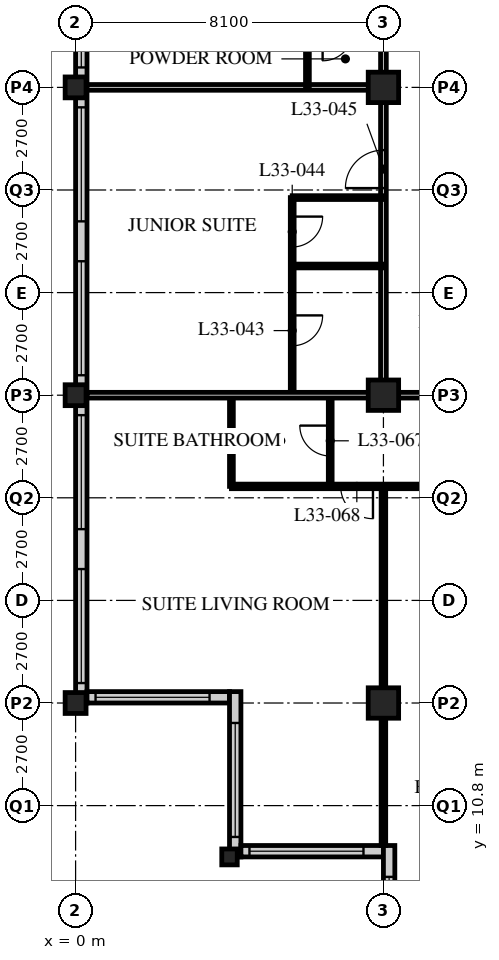
"""IFC4 building model, lengths in metres.
Left out: names, types, materials, properties, quantities, classifications, styles, units other than length and angle.
Written with IfcOpenShell. Run it as: python <this file> out.ifc"""

import sys

from ifc_helpers import new_model, si_unit, direction, frame, frame_2d, origin, origin_2d, place, context, subcontext, project, spatial, rectangle, hollow_rectangle, i_section, extrude, element, fill, save


model = new_model("IFC4")
c1 = context("Model", 3, precision=1e-05, world=origin(), true_north=direction((0.0, 1.0)))
c2 = subcontext(c1, "Body", "Model", "MODEL_VIEW")
j1 = project(units=[si_unit("LENGTHUNIT", "METRE"), si_unit("PLANEANGLEUNIT", "RADIAN")], contexts=[c1])
p1 = place(None, origin())
s1 = spatial("IfcSite", under=j1, at=p1, CompositionType="ELEMENT")
p2 = place(p1, origin())
s2 = spatial("IfcBuilding", under=s1, at=p2, CompositionType="ELEMENT")
p3 = place(p2, frame((0.0, 0.0, 130.6)))
s3 = spatial("IfcBuildingStorey", under=s2, at=p3, CompositionType="ELEMENT", Elevation=130.6)
for number, where, z_axis, x_axis in (
    (1, (0.0, 13.5, 0.0), (0.0, 0.0, 1.0), (1.0, 0.0, 0.0)),
    (2, (0.0, 21.6, 0.0), (0.0, 0.0, 1.0), (1.0, 0.0, 0.0)),
    (3, (0.0, 29.7, 0.0), (0.0, 0.0, 1.0), (1.0, 0.0, 0.0)),
):
    element("IfcColumn", number, at=place(p3, frame(where, z_axis=z_axis, x_axis=x_axis)), inside=s3, PredefinedType="COLUMN", context=c2, shape_type="SweptSolid", body=[
        extrude(hollow_rectangle(XDim=0.55, YDim=0.55, WallThickness=0.04, at=origin_2d()), origin(), (0.0, 0.0, 1.0), 3.4),
    ])
p4 = place(p3, frame((4.05, 9.45, 0.0), z_axis=(0.0, 0.0, 1.0), x_axis=(1.0, 0.0, 0.0)))
e4 = element("IfcColumn", 4, at=p4, inside=s3, PredefinedType="COLUMN", context=c2, shape_type="SweptSolid", body=[
    extrude(i_section(OverallWidth=0.407, OverallDepth=0.419, WebThickness=0.031, FlangeThickness=0.049, FilletRadius=0.015, at=origin_2d()), origin(), (0.0, 0.0, 1.0), 3.4),
])
for number, where, z_axis, x_axis in (
    (5, (8.1, 13.5, 0.0), (0.0, 0.0, 1.0), (1.0, 0.0, 0.0)),
    (6, (8.1, 21.6, 0.0), (0.0, 0.0, 1.0), (1.0, 0.0, 0.0)),
    (7, (8.1, 29.7, 0.0), (0.0, 0.0, 1.0), (1.0, 0.0, 0.0)),
):
    element("IfcColumn", number, at=place(p3, frame(where, z_axis=z_axis, x_axis=x_axis)), inside=s3, PredefinedType="COLUMN", context=c2, shape_type="SweptSolid", body=[
        extrude(hollow_rectangle(XDim=0.8, YDim=0.8, WallThickness=0.08, at=origin_2d()), origin(), (0.0, 0.0, 1.0), 3.4),
    ])
p5 = place(p3, frame((0.15, 45.6, 0.0), z_axis=(0.0, 0.0, 1.0), x_axis=(0.0, -1.0, 0.0)))
e8 = element("IfcWall", 8, at=p5, inside=s3, PredefinedType="SOLIDWALL", context=c2, shape_type="SweptSolid", body=[
    extrude(rectangle(XDim=32.1, YDim=0.3, at=frame_2d((16.05, 0.0))), origin(), (0.0, 0.0, 1.0), 3.19),
])
p6 = place(p5, frame((0.225, 0.0, 0.9)))
e9 = element("IfcOpeningElement", 9, at=p6, cuts=e8, PredefinedType="OPENING", context=c2, shape_type="SweptSolid", body=[
    extrude(rectangle(XDim=3.0, YDim=2.0, at=frame_2d((1.5, 1.0))), frame((0.0, 0.16, 0.0), z_axis=(0.0, -1.0, 0.0), x_axis=(1.0, 0.0, 0.0)), (0.0, 0.0, 1.0), 0.32),
])
p7 = place(p5, frame((4.275, 0.0, 0.9)))
e10 = element("IfcOpeningElement", 10, at=p7, cuts=e8, PredefinedType="OPENING", context=c2, shape_type="SweptSolid", body=[
    extrude(rectangle(XDim=3.0, YDim=2.0, at=frame_2d((1.5, 1.0))), frame((0.0, 0.16, 0.0), z_axis=(0.0, -1.0, 0.0), x_axis=(1.0, 0.0, 0.0)), (0.0, 0.0, 1.0), 0.32),
])
p8 = place(p5, frame((8.325, 0.0, 0.9)))
e11 = element("IfcOpeningElement", 11, at=p8, cuts=e8, PredefinedType="OPENING", context=c2, shape_type="SweptSolid", body=[
    extrude(rectangle(XDim=3.0, YDim=2.0, at=frame_2d((1.5, 1.0))), frame((0.0, 0.16, 0.0), z_axis=(0.0, -1.0, 0.0), x_axis=(1.0, 0.0, 0.0)), (0.0, 0.0, 1.0), 0.32),
])
p9 = place(p5, frame((12.375, 0.0, 0.9)))
e12 = element("IfcOpeningElement", 12, at=p9, cuts=e8, PredefinedType="OPENING", context=c2, shape_type="SweptSolid", body=[
    extrude(rectangle(XDim=3.0, YDim=2.0, at=frame_2d((1.5, 1.0))), frame((0.0, 0.16, 0.0), z_axis=(0.0, -1.0, 0.0), x_axis=(1.0, 0.0, 0.0)), (0.0, 0.0, 1.0), 0.32),
])
p10 = place(p5, frame((16.425, 0.0, 0.9)))
e13 = element("IfcOpeningElement", 13, at=p10, cuts=e8, PredefinedType="OPENING", context=c2, shape_type="SweptSolid", body=[
    extrude(rectangle(XDim=3.0, YDim=2.0, at=frame_2d((1.5, 1.0))), frame((0.0, 0.16, 0.0), z_axis=(0.0, -1.0, 0.0), x_axis=(1.0, 0.0, 0.0)), (0.0, 0.0, 1.0), 0.32),
])
p11 = place(p5, frame((20.475, 0.0, 0.9)))
e14 = element("IfcOpeningElement", 14, at=p11, cuts=e8, PredefinedType="OPENING", context=c2, shape_type="SweptSolid", body=[
    extrude(rectangle(XDim=3.0, YDim=2.0, at=frame_2d((1.5, 1.0))), frame((0.0, 0.16, 0.0), z_axis=(0.0, -1.0, 0.0), x_axis=(1.0, 0.0, 0.0)), (0.0, 0.0, 1.0), 0.32),
])
p12 = place(p5, frame((24.525, 0.0, 0.9)))
e15 = element("IfcOpeningElement", 15, at=p12, cuts=e8, PredefinedType="OPENING", context=c2, shape_type="SweptSolid", body=[
    extrude(rectangle(XDim=3.0, YDim=2.0, at=frame_2d((1.5, 1.0))), frame((0.0, 0.16, 0.0), z_axis=(0.0, -1.0, 0.0), x_axis=(1.0, 0.0, 0.0)), (0.0, 0.0, 1.0), 0.32),
])
p13 = place(p5, frame((28.575, 0.0, 0.9)))
e16 = element("IfcOpeningElement", 16, at=p13, cuts=e8, PredefinedType="OPENING", context=c2, shape_type="SweptSolid", body=[
    extrude(rectangle(XDim=3.0, YDim=2.0, at=frame_2d((1.5, 1.0))), frame((0.0, 0.16, 0.0), z_axis=(0.0, -1.0, 0.0), x_axis=(1.0, 0.0, 0.0)), (0.0, 0.0, 1.0), 0.32),
])
p14 = place(p3, frame((0.3, 13.65, 0.0), z_axis=(0.0, 0.0, 1.0), x_axis=(1.0, 0.0, 0.0)))
e17 = element("IfcWall", 17, at=p14, inside=s3, PredefinedType="SOLIDWALL", context=c2, shape_type="SweptSolid", body=[
    extrude(rectangle(XDim=3.75, YDim=0.3, at=frame_2d((1.875, 0.0))), origin(), (0.0, 0.0, 1.0), 3.19),
])
p15 = place(p14, frame((0.225, 0.0, 0.9)))
e18 = element("IfcOpeningElement", 18, at=p15, cuts=e17, PredefinedType="OPENING", context=c2, shape_type="SweptSolid", body=[
    extrude(rectangle(XDim=3.0, YDim=1.5, at=frame_2d((1.5, 0.75))), frame((0.0, 0.16, 0.0), z_axis=(0.0, -1.0, 0.0), x_axis=(1.0, 0.0, 0.0)), (0.0, 0.0, 1.0), 0.32),
])
p16 = place(p3, frame((4.2, 13.8, 0.0), z_axis=(0.0, 0.0, 1.0), x_axis=(0.0, -1.0, 0.0)))
e19 = element("IfcWall", 19, at=p16, inside=s3, PredefinedType="SOLIDWALL", context=c2, shape_type="SweptSolid", body=[
    extrude(rectangle(XDim=4.35, YDim=0.3, at=frame_2d((2.175, 0.0))), origin(), (0.0, 0.0, 1.0), 3.19),
])
p17 = place(p16, frame((0.825, 0.0, 0.9)))
e20 = element("IfcOpeningElement", 20, at=p17, cuts=e19, PredefinedType="OPENING", context=c2, shape_type="SweptSolid", body=[
    extrude(rectangle(XDim=3.0, YDim=1.5, at=frame_2d((1.5, 0.75))), frame((0.0, 0.16, 0.0), z_axis=(0.0, -1.0, 0.0), x_axis=(1.0, 0.0, 0.0)), (0.0, 0.0, 1.0), 0.32),
])
p18 = place(p3, frame((4.35, 9.6, 0.0), z_axis=(0.0, 0.0, 1.0), x_axis=(1.0, 0.0, 0.0)))
e21 = element("IfcWall", 21, at=p18, inside=s3, PredefinedType="SOLIDWALL", context=c2, shape_type="SweptSolid", body=[
    extrude(rectangle(XDim=3.75, YDim=0.3, at=frame_2d((1.875, 0.0))), origin(), (0.0, 0.0, 1.0), 3.19),
])
p19 = place(p18, frame((0.225, 0.0, 0.9)))
e22 = element("IfcOpeningElement", 22, at=p19, cuts=e21, PredefinedType="OPENING", context=c2, shape_type="SweptSolid", body=[
    extrude(rectangle(XDim=3.0, YDim=1.5, at=frame_2d((1.5, 0.75))), frame((0.0, 0.16, 0.0), z_axis=(0.0, -1.0, 0.0), x_axis=(1.0, 0.0, 0.0)), (0.0, 0.0, 1.0), 0.32),
])
p20 = place(p3, frame((8.25, 9.75, 0.0), z_axis=(0.0, 0.0, 1.0), x_axis=(0.0, -1.0, 0.0)))
e23 = element("IfcWall", 23, at=p20, inside=s3, PredefinedType="SOLIDWALL", context=c2, shape_type="SweptSolid", body=[
    extrude(rectangle(XDim=4.35, YDim=0.3, at=frame_2d((2.175, 0.0))), origin(), (0.0, 0.0, 1.0), 3.19),
])
p21 = place(p20, frame((0.825, 0.0, 0.9)))
e24 = element("IfcOpeningElement", 24, at=p21, cuts=e23, PredefinedType="OPENING", context=c2, shape_type="SweptSolid", body=[
    extrude(rectangle(XDim=3.0, YDim=1.5, at=frame_2d((1.5, 0.75))), frame((0.0, 0.16, 0.0), z_axis=(0.0, -1.0, 0.0), x_axis=(1.0, 0.0, 0.0)), (0.0, 0.0, 1.0), 0.32),
])
p22 = place(p3, frame((8.1, 21.6, 0.0), z_axis=(0.0, 0.0, 1.0), x_axis=(1.0, 0.0, 0.0)))
e25 = element("IfcWall", 25, at=p22, inside=s3, PredefinedType="PARTITIONING", context=c2, shape_type="SweptSolid", body=[
    extrude(rectangle(XDim=40.5, YDim=0.15, at=frame_2d((20.25, 0.0))), origin(), (0.0, 0.0, 1.0), 2.578),
])
p23 = place(p22, frame((9.625, 0.0, 0.0)))
e26 = element("IfcOpeningElement", 26, at=p23, cuts=e25, PredefinedType="OPENING", context=c2, shape_type="SweptSolid", body=[
    extrude(rectangle(XDim=1.0, YDim=2.1, at=frame_2d((0.5, 1.05))), frame((0.0, 0.085, 0.0), z_axis=(0.0, -1.0, 0.0), x_axis=(1.0, 0.0, 0.0)), (0.0, 0.0, 1.0), 0.17),
])
p24 = place(p22, frame((21.775, 0.0, 0.0)))
e27 = element("IfcOpeningElement", 27, at=p24, cuts=e25, PredefinedType="OPENING", context=c2, shape_type="SweptSolid", body=[
    extrude(rectangle(XDim=1.0, YDim=2.1, at=frame_2d((0.5, 1.05))), frame((0.0, 0.085, 0.0), z_axis=(0.0, -1.0, 0.0), x_axis=(1.0, 0.0, 0.0)), (0.0, 0.0, 1.0), 0.17),
])
p25 = place(p22, frame((28.95, 0.0, 0.0)))
e28 = element("IfcOpeningElement", 28, at=p25, cuts=e25, PredefinedType="OPENING", context=c2, shape_type="SweptSolid", body=[
    extrude(rectangle(XDim=1.0, YDim=2.1, at=frame_2d((0.5, 1.05))), frame((0.0, 0.085, 0.0), z_axis=(0.0, -1.0, 0.0), x_axis=(1.0, 0.0, 0.0)), (0.0, 0.0, 1.0), 0.17),
])
p26 = place(p22, frame((34.85, 0.0, 0.0)))
e29 = element("IfcOpeningElement", 29, at=p26, cuts=e25, PredefinedType="OPENING", context=c2, shape_type="SweptSolid", body=[
    extrude(rectangle(XDim=1.0, YDim=2.1, at=frame_2d((0.5, 1.05))), frame((0.0, 0.085, 0.0), z_axis=(0.0, -1.0, 0.0), x_axis=(1.0, 0.0, 0.0)), (0.0, 0.0, 1.0), 0.17),
])
p27 = place(p22, frame((1.525, 0.0, 0.0)))
e30 = element("IfcOpeningElement", 30, at=p27, cuts=e25, PredefinedType="OPENING", context=c2, shape_type="SweptSolid", body=[
    extrude(rectangle(XDim=1.0, YDim=2.1, at=frame_2d((0.5, 1.05))), frame((0.0, 0.085, 0.0), z_axis=(0.0, -1.0, 0.0), x_axis=(1.0, 0.0, 0.0)), (0.0, 0.0, 1.0), 0.17),
])
p28 = place(p22, frame((37.975, 0.0, 0.0)))
e31 = element("IfcOpeningElement", 31, at=p28, cuts=e25, PredefinedType="OPENING", context=c2, shape_type="SweptSolid", body=[
    extrude(rectangle(XDim=1.0, YDim=2.1, at=frame_2d((0.5, 1.05))), frame((0.0, 0.085, 0.0), z_axis=(0.0, -1.0, 0.0), x_axis=(1.0, 0.0, 0.0)), (0.0, 0.0, 1.0), 0.17),
])
p29 = place(p3, frame((8.1, 21.6, 0.0), z_axis=(0.0, 0.0, 1.0), x_axis=(0.0, 1.0, 0.0)))
e32 = element("IfcWall", 32, at=p29, inside=s3, PredefinedType="PARTITIONING", context=c2, shape_type="SweptSolid", body=[
    extrude(rectangle(XDim=24.3, YDim=0.15, at=frame_2d((12.15, 0.0))), origin(), (0.0, 0.0, 1.0), 2.578),
])
p30 = place(p29, frame((5.45, 0.0, 0.0)))
e33 = element("IfcOpeningElement", 33, at=p30, cuts=e32, PredefinedType="OPENING", context=c2, shape_type="SweptSolid", body=[
    extrude(rectangle(XDim=1.0, YDim=2.1, at=frame_2d((0.5, 1.05))), frame((0.0, 0.085, 0.0), z_axis=(0.0, -1.0, 0.0), x_axis=(1.0, 0.0, 0.0)), (0.0, 0.0, 1.0), 0.17),
])
p31 = place(p29, frame((10.0, 0.0, 0.0)))
e34 = element("IfcOpeningElement", 34, at=p31, cuts=e32, PredefinedType="OPENING", context=c2, shape_type="SweptSolid", body=[
    extrude(rectangle(XDim=1.0, YDim=2.1, at=frame_2d((0.5, 1.05))), frame((0.0, 0.085, 0.0), z_axis=(0.0, -1.0, 0.0), x_axis=(1.0, 0.0, 0.0)), (0.0, 0.0, 1.0), 0.17),
])
p32 = place(p29, frame((21.65, 0.0, 0.0)))
e35 = element("IfcOpeningElement", 35, at=p32, cuts=e32, PredefinedType="OPENING", context=c2, shape_type="SweptSolid", body=[
    extrude(rectangle(XDim=1.0, YDim=2.1, at=frame_2d((0.5, 1.05))), frame((0.0, 0.085, 0.0), z_axis=(0.0, -1.0, 0.0), x_axis=(1.0, 0.0, 0.0)), (0.0, 0.0, 1.0), 0.17),
])
p33 = place(p3, frame((5.7, 21.6, 0.0), z_axis=(0.0, 0.0, 1.0), x_axis=(0.0, 1.0, 0.0)))
e36 = element("IfcWall", 36, at=p33, inside=s3, PredefinedType="PARTITIONING", context=c2, shape_type="SweptSolid", body=[
    extrude(rectangle(XDim=5.2, YDim=0.1, at=frame_2d((2.6, 0.0))), origin(), (0.0, 0.0, 1.0), 3.19),
])
p34 = place(p33, frame((1.3, 0.0, 0.0)))
e37 = element("IfcOpeningElement", 37, at=p34, cuts=e36, PredefinedType="OPENING", context=c2, shape_type="SweptSolid", body=[
    extrude(rectangle(XDim=0.8, YDim=2.1, at=frame_2d((0.4, 1.05))), frame((0.0, 0.06, 0.0), z_axis=(0.0, -1.0, 0.0), x_axis=(1.0, 0.0, 0.0)), (0.0, 0.0, 1.0), 0.12),
])
p35 = place(p33, frame((3.9, 0.0, 0.0)))
e38 = element("IfcOpeningElement", 38, at=p35, cuts=e36, PredefinedType="OPENING", context=c2, shape_type="SweptSolid", body=[
    extrude(rectangle(XDim=0.8, YDim=2.1, at=frame_2d((0.4, 1.05))), frame((0.0, 0.06, 0.0), z_axis=(0.0, -1.0, 0.0), x_axis=(1.0, 0.0, 0.0)), (0.0, 0.0, 1.0), 0.12),
])
for number, where, z_axis, x_axis in (
    (39, (8.1, 25.0, 0.0), (0.0, 0.0, 1.0), (-1.0, 0.0, 0.0)),
    (40, (8.1, 26.8, 0.0), (0.0, 0.0, 1.0), (-1.0, 0.0, 0.0)),
):
    element("IfcWall", number, at=place(p3, frame(where, z_axis=z_axis, x_axis=x_axis)), inside=s3, PredefinedType="PARTITIONING", context=c2, shape_type="SweptSolid", body=[
        extrude(rectangle(XDim=2.4, YDim=0.1, at=frame_2d((1.2, 0.0))), origin(), (0.0, 0.0, 1.0), 3.19),
    ])
p36 = place(p3, frame((8.1, 29.7, 0.0), z_axis=(0.0, 0.0, 1.0), x_axis=(-1.0, 0.0, 0.0)))
e41 = element("IfcWall", 41, at=p36, inside=s3, PredefinedType="PARTITIONING", context=c2, shape_type="SweptSolid", body=[
    extrude(rectangle(XDim=7.8, YDim=0.15, at=frame_2d((3.9, 0.0))), origin(), (0.0, 0.0, 1.0), 2.578),
])
p37 = place(p3, frame((6.1, 29.7, 0.0), z_axis=(0.0, 0.0, 1.0), x_axis=(0.0, 1.0, 0.0)))
e42 = element("IfcWall", 42, at=p37, inside=s3, PredefinedType="PARTITIONING", context=c2, shape_type="SweptSolid", body=[
    extrude(rectangle(XDim=1.5, YDim=0.1, at=frame_2d((0.75, 0.0))), origin(), (0.0, 0.0, 1.0), 3.19),
])
p38 = place(p3, frame((6.7, 21.6, 0.0), z_axis=(0.0, 0.0, 1.0), x_axis=(0.0, -1.0, 0.0)))
e43 = element("IfcWall", 43, at=p38, inside=s3, PredefinedType="PARTITIONING", context=c2, shape_type="SweptSolid", body=[
    extrude(rectangle(XDim=2.4, YDim=0.1, at=frame_2d((1.2, 0.0))), origin(), (0.0, 0.0, 1.0), 3.19),
])
p39 = place(p38, frame((0.8, 0.0, 0.0)))
e44 = element("IfcOpeningElement", 44, at=p39, cuts=e43, PredefinedType="OPENING", context=c2, shape_type="SweptSolid", body=[
    extrude(rectangle(XDim=0.8, YDim=2.1, at=frame_2d((0.4, 1.05))), frame((0.0, 0.06, 0.0), z_axis=(0.0, -1.0, 0.0), x_axis=(1.0, 0.0, 0.0)), (0.0, 0.0, 1.0), 0.12),
])
p40 = place(p3, frame((4.1, 21.6, 0.0), z_axis=(0.0, 0.0, 1.0), x_axis=(0.0, -1.0, 0.0)))
e45 = element("IfcWall", 45, at=p40, inside=s3, PredefinedType="PARTITIONING", context=c2, shape_type="SweptSolid", body=[
    extrude(rectangle(XDim=2.4, YDim=0.1, at=frame_2d((1.2, 0.0))), origin(), (0.0, 0.0, 1.0), 3.19),
])
p41 = place(p3, frame((4.1, 19.2, 0.0), z_axis=(0.0, 0.0, 1.0), x_axis=(1.0, 0.0, 0.0)))
e46 = element("IfcWall", 46, at=p41, inside=s3, PredefinedType="PARTITIONING", context=c2, shape_type="SweptSolid", body=[
    extrude(rectangle(XDim=8.05, YDim=0.12, at=frame_2d((4.025, 0.0))), origin(), (0.0, 0.0, 1.0), 3.19),
])
p42 = place(p41, frame((6.725, 0.0, 0.0)))
e47 = element("IfcOpeningElement", 47, at=p42, cuts=e46, PredefinedType="OPENING", context=c2, shape_type="SweptSolid", body=[
    extrude(rectangle(XDim=0.85, YDim=2.1, at=frame_2d((0.425, 1.05))), frame((0.0, 0.07, 0.0), z_axis=(0.0, -1.0, 0.0), x_axis=(1.0, 0.0, 0.0)), (0.0, 0.0, 1.0), 0.14),
])
p43 = place(p41, frame((2.875, 0.0, 0.0)))
e48 = element("IfcOpeningElement", 48, at=p43, cuts=e46, PredefinedType="OPENING", context=c2, shape_type="SweptSolid", body=[
    extrude(rectangle(XDim=0.85, YDim=2.1, at=frame_2d((0.425, 1.05))), frame((0.0, 0.07, 0.0), z_axis=(0.0, -1.0, 0.0), x_axis=(1.0, 0.0, 0.0)), (0.0, 0.0, 1.0), 0.14),
])
p44 = place(p3, frame((8.1, 19.2, 0.0), z_axis=(0.0, 0.0, 1.0), x_axis=(0.0, -1.0, 0.0)))
e49 = element("IfcWall", 49, at=p44, inside=s3, PredefinedType="PARTITIONING", context=c2, shape_type="SweptSolid", body=[
    extrude(rectangle(XDim=9.45, YDim=0.12, at=frame_2d((4.725, 0.0))), origin(), (0.0, 0.0, 1.0), 2.578),
])
p45 = place(p3, frame((0.3, 21.6, 0.0), z_axis=(0.0, 0.0, 1.0), x_axis=(1.0, 0.0, 0.0)))
e50 = element("IfcWall", 50, at=p45, inside=s3, PredefinedType="PARTITIONING", context=c2, shape_type="SweptSolid", body=[
    extrude(rectangle(XDim=7.8, YDim=0.15, at=frame_2d((3.9, 0.0))), origin(), (0.0, 0.0, 1.0), 2.578),
])
p46 = place(p9, origin())
e51 = element("IfcWindow", 51, at=p46, inside=s3, PartitioningType="SINGLE_PANEL", PredefinedType="WINDOW", context=c2, shape_type="SweptSolid", body=[
    extrude(rectangle(XDim=3.0, YDim=2.0, at=frame_2d((1.5, 1.0))), frame((0.0, 0.03, 0.0), z_axis=(0.0, -1.0, 0.0), x_axis=(1.0, 0.0, 0.0)), (0.0, 0.0, 1.0), 0.06),
])
fill(e12, e51)
p47 = place(p10, origin())
e52 = element("IfcWindow", 52, at=p47, inside=s3, PartitioningType="SINGLE_PANEL", PredefinedType="WINDOW", context=c2, shape_type="SweptSolid", body=[
    extrude(rectangle(XDim=3.0, YDim=2.0, at=frame_2d((1.5, 1.0))), frame((0.0, 0.03, 0.0), z_axis=(0.0, -1.0, 0.0), x_axis=(1.0, 0.0, 0.0)), (0.0, 0.0, 1.0), 0.06),
])
fill(e13, e52)
p48 = place(p11, origin())
e53 = element("IfcWindow", 53, at=p48, inside=s3, PartitioningType="SINGLE_PANEL", PredefinedType="WINDOW", context=c2, shape_type="SweptSolid", body=[
    extrude(rectangle(XDim=3.0, YDim=2.0, at=frame_2d((1.5, 1.0))), frame((0.0, 0.03, 0.0), z_axis=(0.0, -1.0, 0.0), x_axis=(1.0, 0.0, 0.0)), (0.0, 0.0, 1.0), 0.06),
])
fill(e14, e53)
p49 = place(p12, origin())
e54 = element("IfcWindow", 54, at=p49, inside=s3, PartitioningType="SINGLE_PANEL", PredefinedType="WINDOW", context=c2, shape_type="SweptSolid", body=[
    extrude(rectangle(XDim=3.0, YDim=2.0, at=frame_2d((1.5, 1.0))), frame((0.0, 0.03, 0.0), z_axis=(0.0, -1.0, 0.0), x_axis=(1.0, 0.0, 0.0)), (0.0, 0.0, 1.0), 0.06),
])
fill(e15, e54)
p50 = place(p13, origin())
e55 = element("IfcWindow", 55, at=p50, inside=s3, PartitioningType="SINGLE_PANEL", PredefinedType="WINDOW", context=c2, shape_type="SweptSolid", body=[
    extrude(rectangle(XDim=3.0, YDim=2.0, at=frame_2d((1.5, 1.0))), frame((0.0, 0.03, 0.0), z_axis=(0.0, -1.0, 0.0), x_axis=(1.0, 0.0, 0.0)), (0.0, 0.0, 1.0), 0.06),
])
fill(e16, e55)
p51 = place(p15, origin())
e56 = element("IfcWindow", 56, at=p51, inside=s3, PartitioningType="SINGLE_PANEL", PredefinedType="WINDOW", context=c2, shape_type="SweptSolid", body=[
    extrude(rectangle(XDim=3.0, YDim=1.5, at=frame_2d((1.5, 0.75))), frame((0.0, 0.03, 0.0), z_axis=(0.0, -1.0, 0.0), x_axis=(1.0, 0.0, 0.0)), (0.0, 0.0, 1.0), 0.06),
])
fill(e18, e56)
p52 = place(p17, origin())
e57 = element("IfcWindow", 57, at=p52, inside=s3, PartitioningType="SINGLE_PANEL", PredefinedType="WINDOW", context=c2, shape_type="SweptSolid", body=[
    extrude(rectangle(XDim=3.0, YDim=1.5, at=frame_2d((1.5, 0.75))), frame((0.0, 0.03, 0.0), z_axis=(0.0, -1.0, 0.0), x_axis=(1.0, 0.0, 0.0)), (0.0, 0.0, 1.0), 0.06),
])
fill(e20, e57)
p53 = place(p19, origin())
e58 = element("IfcWindow", 58, at=p53, inside=s3, PartitioningType="SINGLE_PANEL", PredefinedType="WINDOW", context=c2, shape_type="SweptSolid", body=[
    extrude(rectangle(XDim=3.0, YDim=1.5, at=frame_2d((1.5, 0.75))), frame((0.0, 0.03, 0.0), z_axis=(0.0, -1.0, 0.0), x_axis=(1.0, 0.0, 0.0)), (0.0, 0.0, 1.0), 0.06),
])
fill(e22, e58)
p54 = place(p21, origin())
e59 = element("IfcWindow", 59, at=p54, inside=s3, PartitioningType="SINGLE_PANEL", PredefinedType="WINDOW", context=c2, shape_type="SweptSolid", body=[
    extrude(rectangle(XDim=3.0, YDim=1.5, at=frame_2d((1.5, 0.75))), frame((0.0, 0.03, 0.0), z_axis=(0.0, -1.0, 0.0), x_axis=(1.0, 0.0, 0.0)), (0.0, 0.0, 1.0), 0.06),
])
fill(e24, e59)
p55 = place(p34, origin())
e60 = element("IfcDoor", 60, at=p55, inside=s3, OperationType="SINGLE_SWING_LEFT", PredefinedType="DOOR", context=c2, shape_type="SweptSolid", body=[
    extrude(rectangle(XDim=0.8, YDim=2.1, at=frame_2d((0.4, 1.05))), frame((0.0, 0.025, 0.0), z_axis=(0.0, -1.0, 0.0), x_axis=(1.0, 0.0, 0.0)), (0.0, 0.0, 1.0), 0.05),
])
fill(e37, e60)
p56 = place(p35, origin())
e61 = element("IfcDoor", 61, at=p56, inside=s3, OperationType="SINGLE_SWING_LEFT", PredefinedType="DOOR", context=c2, shape_type="SweptSolid", body=[
    extrude(rectangle(XDim=0.8, YDim=2.1, at=frame_2d((0.4, 1.05))), frame((0.0, 0.025, 0.0), z_axis=(0.0, -1.0, 0.0), x_axis=(1.0, 0.0, 0.0)), (0.0, 0.0, 1.0), 0.05),
])
fill(e38, e61)
p57 = place(p30, origin())
e62 = element("IfcDoor", 62, at=p57, inside=s3, OperationType="SINGLE_SWING_LEFT", PredefinedType="DOOR", context=c2, shape_type="SweptSolid", body=[
    extrude(rectangle(XDim=1.0, YDim=2.1, at=frame_2d((0.5, 1.05))), frame((0.0, 0.025, 0.0), z_axis=(0.0, -1.0, 0.0), x_axis=(1.0, 0.0, 0.0)), (0.0, 0.0, 1.0), 0.05),
])
fill(e33, e62)
p58 = place(p39, origin())
e63 = element("IfcDoor", 63, at=p58, inside=s3, OperationType="SINGLE_SWING_RIGHT", PredefinedType="DOOR", context=c2, shape_type="SweptSolid", body=[
    extrude(rectangle(XDim=0.8, YDim=2.1, at=frame_2d((0.4, 1.05))), frame((0.0, 0.025, 0.0), z_axis=(0.0, -1.0, 0.0), x_axis=(1.0, 0.0, 0.0)), (0.0, 0.0, 1.0), 0.05),
])
fill(e44, e63)
p59 = place(p43, origin())
e64 = element("IfcDoor", 64, at=p59, inside=s3, OperationType="SINGLE_SWING_LEFT", PredefinedType="DOOR", context=c2, shape_type="SweptSolid", body=[
    extrude(rectangle(XDim=0.85, YDim=2.1, at=frame_2d((0.425, 1.05))), frame((0.0, 0.025, 0.0), z_axis=(0.0, -1.0, 0.0), x_axis=(1.0, 0.0, 0.0)), (0.0, 0.0, 1.0), 0.05),
])
fill(e48, e64)
save(model, sys.argv[1])
